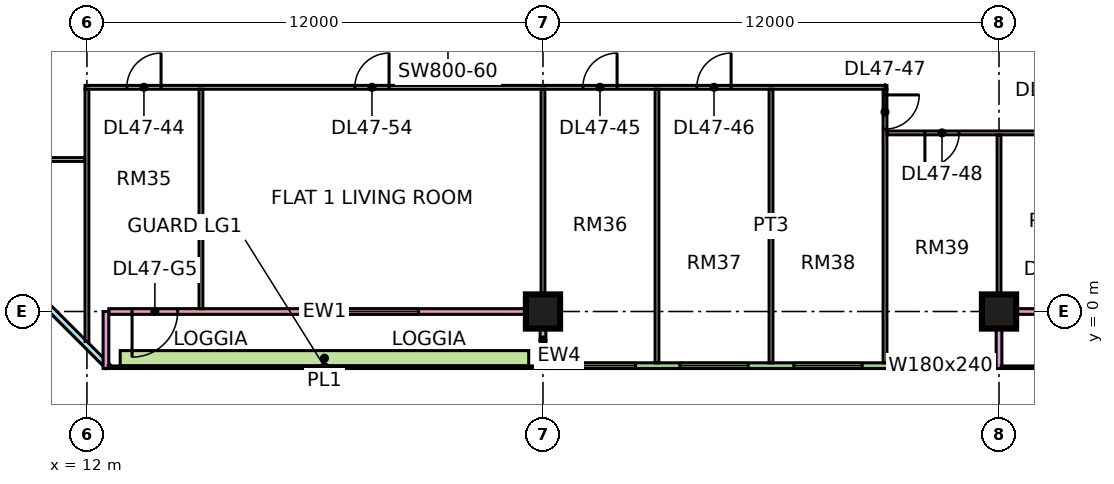
"""IFC4 building model, lengths in metres.
Left out: names, types, materials, properties, quantities, classifications, styles, units other than length and angle.
Written with IfcOpenShell. Run it as: python <this file> out.ifc"""

import sys

from ifc_helpers import new_model, si_unit, direction, frame, frame_2d, origin, origin_2d, place, context, subcontext, project, spatial, rectangle, extrude, element, fill, save


model = new_model("IFC4")
c1 = context("Model", 3, precision=1e-05, world=origin(), true_north=direction((0.0, 1.0)))
c2 = subcontext(c1, "Body", "Model", "MODEL_VIEW")
j1 = project(units=[si_unit("LENGTHUNIT", "METRE"), si_unit("PLANEANGLEUNIT", "RADIAN")], contexts=[c1])
p1 = place(None, origin())
s1 = spatial("IfcSite", under=j1, at=p1, CompositionType="ELEMENT")
p2 = place(p1, origin())
s2 = spatial("IfcBuilding", under=s1, at=p2, CompositionType="ELEMENT")
p3 = place(p2, frame((0.0, 0.0, 202.4)))
s3 = spatial("IfcBuildingStorey", under=s2, at=p3, CompositionType="ELEMENT", Elevation=202.4)
for number, where, z_axis, x_axis in (
    (1, (24.0, 0.0, 0.0), (0.0, 0.0, 1.0), (1.0, 0.0, 0.0)),
    (2, (36.0, 0.0, 0.0), (0.0, 0.0, 1.0), (1.0, 0.0, 0.0)),
):
    element("IfcColumn", number, at=place(p3, frame(where, z_axis=z_axis, x_axis=x_axis)), inside=s3, PredefinedType="COLUMN", context=c2, shape_type="SweptSolid", body=[
        extrude(rectangle(XDim=0.9, YDim=0.9, at=origin_2d()), origin(), (0.0, 0.0, 1.0), 3.75),
    ])
p4 = place(p3, frame((-1.447, 12.553, 0.0), z_axis=(0.0, 0.0, 1.0), x_axis=(0.707106781187, -0.707106781187, 0.0)))
e3 = element("IfcWall", 3, at=p4, inside=s3, PredefinedType="SOLIDWALL", context=c2, shape_type="SweptSolid", body=[
    extrude(rectangle(XDim=19.799, YDim=0.15, at=frame_2d((9.899, 0.0))), origin(), (0.0, 0.0, 1.0), 3.3),
])
p5 = place(p4, frame((2.212, 0.0, 0.45)))
e4 = element("IfcOpeningElement", 4, at=p5, cuts=e3, PredefinedType="OPENING", context=c2, shape_type="SweptSolid", body=[
    extrude(rectangle(XDim=3.0, YDim=2.4, at=frame_2d((1.5, 1.2))), frame((0.0, 0.085, 0.0), z_axis=(0.0, -1.0, 0.0), x_axis=(1.0, 0.0, 0.0)), (0.0, 0.0, 1.0), 0.17),
])
p6 = place(p4, frame((10.216, 0.0, 0.45)))
e5 = element("IfcOpeningElement", 5, at=p6, cuts=e3, PredefinedType="OPENING", context=c2, shape_type="SweptSolid", body=[
    extrude(rectangle(XDim=3.0, YDim=2.4, at=frame_2d((1.5, 1.2))), frame((0.0, 0.085, 0.0), z_axis=(0.0, -1.0, 0.0), x_axis=(1.0, 0.0, 0.0)), (0.0, 0.0, 1.0), 0.17),
])
p7 = place(p3, frame((12.575, 0.0, 0.0), z_axis=(0.0, 0.0, 1.0), x_axis=(1.0, 0.0, 0.0)))
e6 = element("IfcWall", 6, at=p7, inside=s3, PredefinedType="SOLIDWALL", context=c2, shape_type="SweptSolid", body=[
    extrude(rectangle(XDim=11.35, YDim=0.15, at=frame_2d((5.675, 0.0))), origin(), (0.0, 0.0, 1.0), 3.3),
])
p8 = place(p7, frame((0.613, 0.0, 0.0)))
e7 = element("IfcOpeningElement", 7, at=p8, cuts=e6, PredefinedType="OPENING", context=c2, shape_type="SweptSolid", body=[
    extrude(rectangle(XDim=1.2, YDim=2.4, at=frame_2d((0.6, 1.2))), frame((0.0, 0.085, 0.0), z_axis=(0.0, -1.0, 0.0), x_axis=(1.0, 0.0, 0.0)), (0.0, 0.0, 1.0), 0.17),
])
p9 = place(p7, frame((5.15, 0.0, 0.45)))
e8 = element("IfcOpeningElement", 8, at=p9, cuts=e6, PredefinedType="OPENING", context=c2, shape_type="SweptSolid", body=[
    extrude(rectangle(XDim=3.0, YDim=2.4, at=frame_2d((1.5, 1.2))), frame((0.0, 0.085, 0.0), z_axis=(0.0, -1.0, 0.0), x_axis=(1.0, 0.0, 0.0)), (0.0, 0.0, 1.0), 0.17),
])
for number, where, z_axis, x_axis in (
    (9, (12.5, -1.5, 0.0), (0.0, 0.0, 1.0), (0.0, 1.0, 0.0)),
    (10, (24.0, -1.5, 0.0), (0.0, 0.0, 1.0), (0.0, 1.0, 0.0)),
):
    element("IfcWall", number, at=place(p3, frame(where, z_axis=z_axis, x_axis=x_axis)), inside=s3, PredefinedType="SOLIDWALL", context=c2, shape_type="SweptSolid", body=[
        extrude(rectangle(XDim=1.5, YDim=0.15, at=frame_2d((0.75, 0.0))), origin(), (0.0, 0.0, 1.0), 3.3),
    ])
p10 = place(p3, frame((24.075, -1.425, 0.0), z_axis=(0.0, 0.0, 1.0), x_axis=(1.0, 0.0, 0.0)))
e11 = element("IfcWall", 11, at=p10, inside=s3, PredefinedType="SOLIDWALL", context=c2, shape_type="SweptSolid", body=[
    extrude(rectangle(XDim=11.85, YDim=0.15, at=frame_2d((5.925, 0.0))), origin(), (0.0, 0.0, 1.0), 3.3),
])
p11 = place(p10, frame((0.562, 0.0, 0.45)))
e12 = element("IfcOpeningElement", 12, at=p11, cuts=e11, PredefinedType="OPENING", context=c2, shape_type="SweptSolid", body=[
    extrude(rectangle(XDim=1.8, YDim=2.4, at=frame_2d((0.9, 1.2))), frame((0.0, 0.085, 0.0), z_axis=(0.0, -1.0, 0.0), x_axis=(1.0, 0.0, 0.0)), (0.0, 0.0, 1.0), 0.17),
])
p12 = place(p10, frame((3.525, 0.0, 0.45)))
e13 = element("IfcOpeningElement", 13, at=p12, cuts=e11, PredefinedType="OPENING", context=c2, shape_type="SweptSolid", body=[
    extrude(rectangle(XDim=1.8, YDim=2.4, at=frame_2d((0.9, 1.2))), frame((0.0, 0.085, 0.0), z_axis=(0.0, -1.0, 0.0), x_axis=(1.0, 0.0, 0.0)), (0.0, 0.0, 1.0), 0.17),
])
p13 = place(p10, frame((6.525, 0.0, 0.45)))
e14 = element("IfcOpeningElement", 14, at=p13, cuts=e11, PredefinedType="OPENING", context=c2, shape_type="SweptSolid", body=[
    extrude(rectangle(XDim=1.8, YDim=2.4, at=frame_2d((0.9, 1.2))), frame((0.0, 0.085, 0.0), z_axis=(0.0, -1.0, 0.0), x_axis=(1.0, 0.0, 0.0)), (0.0, 0.0, 1.0), 0.17),
])
p14 = place(p10, frame((9.488, 0.0, 0.45)))
e15 = element("IfcOpeningElement", 15, at=p14, cuts=e11, PredefinedType="OPENING", context=c2, shape_type="SweptSolid", body=[
    extrude(rectangle(XDim=1.8, YDim=2.4, at=frame_2d((0.9, 1.2))), frame((0.0, 0.085, 0.0), z_axis=(0.0, -1.0, 0.0), x_axis=(1.0, 0.0, 0.0)), (0.0, 0.0, 1.0), 0.17),
])
p15 = place(p3, frame((36.075, 0.0, 0.0), z_axis=(0.0, 0.0, 1.0), x_axis=(1.0, 0.0, 0.0)))
e16 = element("IfcWall", 16, at=p15, inside=s3, PredefinedType="SOLIDWALL", context=c2, shape_type="SweptSolid", body=[
    extrude(rectangle(XDim=11.85, YDim=0.15, at=frame_2d((5.925, 0.0))), origin(), (0.0, 0.0, 1.0), 3.3),
])
p16 = place(p15, frame((1.1, 0.0, 0.0)))
e17 = element("IfcOpeningElement", 17, at=p16, cuts=e16, PredefinedType="OPENING", context=c2, shape_type="SweptSolid", body=[
    extrude(rectangle(XDim=1.2, YDim=2.4, at=frame_2d((0.6, 1.2))), frame((0.0, 0.085, 0.0), z_axis=(0.0, -1.0, 0.0), x_axis=(1.0, 0.0, 0.0)), (0.0, 0.0, 1.0), 0.17),
])
p17 = place(p15, frame((4.15, 0.0, 0.45)))
e18 = element("IfcOpeningElement", 18, at=p17, cuts=e16, PredefinedType="OPENING", context=c2, shape_type="SweptSolid", body=[
    extrude(rectangle(XDim=3.0, YDim=2.4, at=frame_2d((1.5, 1.2))), frame((0.0, 0.085, 0.0), z_axis=(0.0, -1.0, 0.0), x_axis=(1.0, 0.0, 0.0)), (0.0, 0.0, 1.0), 0.17),
])
p18 = place(p15, frame((10.062, 0.0, 0.45)))
e19 = element("IfcOpeningElement", 19, at=p18, cuts=e16, PredefinedType="OPENING", context=c2, shape_type="SweptSolid", body=[
    extrude(rectangle(XDim=1.2, YDim=2.4, at=frame_2d((0.6, 1.2))), frame((0.0, 0.085, 0.0), z_axis=(0.0, -1.0, 0.0), x_axis=(1.0, 0.0, 0.0)), (0.0, 0.0, 1.0), 0.17),
])
p19 = place(p3, frame((36.0, -1.5, 0.0), z_axis=(0.0, 0.0, 1.0), x_axis=(0.0, 1.0, 0.0)))
e20 = element("IfcWall", 20, at=p19, inside=s3, PredefinedType="SOLIDWALL", context=c2, shape_type="SweptSolid", body=[
    extrude(rectangle(XDim=1.5, YDim=0.15, at=frame_2d((0.75, 0.0))), origin(), (0.0, 0.0, 1.0), 3.3),
])
p20 = place(p3, frame((12.875, -1.229, 0.0), z_axis=(0.0, 0.0, 1.0), x_axis=(1.0, 0.0, 0.0)))
e21 = element("IfcWall", 21, at=p20, inside=s3, PredefinedType="SOLIDWALL", context=c2, shape_type="SweptSolid", body=[
    extrude(rectangle(XDim=10.75, YDim=0.4, at=frame_2d((5.375, 0.0))), origin(), (0.0, 0.0, 1.0), 0.7),
])
p21 = place(p3, frame((9.05, 4.0, 0.0), z_axis=(0.0, 0.0, 1.0), x_axis=(1.0, 0.0, 0.0)))
e22 = element("IfcWall", 22, at=p21, inside=s3, PredefinedType="PARTITIONING", context=c2, shape_type="SweptSolid", body=[
    extrude(rectangle(XDim=2.9, YDim=0.1, at=frame_2d((1.45, 0.0))), origin(), (0.0, 0.0, 1.0), 3.3),
])
p22 = place(p3, frame((11.95, 5.9, 0.0), z_axis=(0.0, 0.0, 1.0), x_axis=(1.0, 0.0, 0.0)))
e23 = element("IfcWall", 23, at=p22, inside=s3, PredefinedType="PARTITIONING", context=c2, shape_type="SweptSolid", body=[
    extrude(rectangle(XDim=21.1, YDim=0.1, at=frame_2d((10.55, 0.0))), origin(), (0.0, 0.0, 1.0), 3.3),
])
p23 = place(p22, frame((1.1, 0.0, 0.0)))
e24 = element("IfcOpeningElement", 24, at=p23, cuts=e23, PredefinedType="OPENING", context=c2, shape_type="SweptSolid", body=[
    extrude(rectangle(XDim=0.9, YDim=2.1, at=frame_2d((0.45, 1.05))), frame((0.0, 0.06, 0.0), z_axis=(0.0, -1.0, 0.0), x_axis=(1.0, 0.0, 0.0)), (0.0, 0.0, 1.0), 0.12),
])
p24 = place(p22, frame((13.1, 0.0, 0.0)))
e25 = element("IfcOpeningElement", 25, at=p24, cuts=e23, PredefinedType="OPENING", context=c2, shape_type="SweptSolid", body=[
    extrude(rectangle(XDim=0.9, YDim=2.1, at=frame_2d((0.45, 1.05))), frame((0.0, 0.06, 0.0), z_axis=(0.0, -1.0, 0.0), x_axis=(1.0, 0.0, 0.0)), (0.0, 0.0, 1.0), 0.12),
])
p25 = place(p22, frame((16.1, 0.0, 0.0)))
e26 = element("IfcOpeningElement", 26, at=p25, cuts=e23, PredefinedType="OPENING", context=c2, shape_type="SweptSolid", body=[
    extrude(rectangle(XDim=0.9, YDim=2.1, at=frame_2d((0.45, 1.05))), frame((0.0, 0.06, 0.0), z_axis=(0.0, -1.0, 0.0), x_axis=(1.0, 0.0, 0.0)), (0.0, 0.0, 1.0), 0.12),
])
p26 = place(p22, frame((7.1, 0.0, 0.0)))
e27 = element("IfcOpeningElement", 27, at=p26, cuts=e23, PredefinedType="OPENING", context=c2, shape_type="SweptSolid", body=[
    extrude(rectangle(XDim=0.9, YDim=2.1, at=frame_2d((0.45, 1.05))), frame((0.0, 0.06, 0.0), z_axis=(0.0, -1.0, 0.0), x_axis=(1.0, 0.0, 0.0)), (0.0, 0.0, 1.0), 0.12),
])
p27 = place(p3, frame((12.0, -0.788, 0.0), z_axis=(0.0, 0.0, 1.0), x_axis=(0.0, 1.0, 0.0)))
e28 = element("IfcWall", 28, at=p27, inside=s3, PredefinedType="PARTITIONING", context=c2, shape_type="SweptSolid", body=[
    extrude(rectangle(XDim=6.638, YDim=0.1, at=frame_2d((3.319, 0.0))), origin(), (0.0, 0.0, 1.0), 3.3),
])
p28 = place(p3, frame((15.0, 0.074, 0.0), z_axis=(0.0, 0.0, 1.0), x_axis=(0.0, 1.0, 0.0)))
e29 = element("IfcWall", 29, at=p28, inside=s3, PredefinedType="PARTITIONING", context=c2, shape_type="SweptSolid", body=[
    extrude(rectangle(XDim=5.776, YDim=0.1, at=frame_2d((2.888, 0.0))), origin(), (0.0, 0.0, 1.0), 3.3),
])
p29 = place(p3, frame((24.0, 0.0, 0.0), z_axis=(0.0, 0.0, 1.0), x_axis=(0.0, 1.0, 0.0)))
e30 = element("IfcWall", 30, at=p29, inside=s3, PredefinedType="PARTITIONING", context=c2, shape_type="SweptSolid", body=[
    extrude(rectangle(XDim=5.85, YDim=0.1, at=frame_2d((2.925, 0.0))), origin(), (0.0, 0.0, 1.0), 3.3),
])
for number, where, z_axis, x_axis in (
    (31, (27.0, -1.351, 0.0), (0.0, 0.0, 1.0), (0.0, 1.0, 0.0)),
    (32, (30.0, -1.351, 0.0), (0.0, 0.0, 1.0), (0.0, 1.0, 0.0)),
):
    element("IfcWall", number, at=place(p3, frame(where, z_axis=z_axis, x_axis=x_axis)), inside=s3, PredefinedType="PARTITIONING", context=c2, shape_type="SweptSolid", body=[
        extrude(rectangle(XDim=7.201, YDim=0.1, at=frame_2d((3.601, 0.0))), origin(), (0.0, 0.0, 1.0), 3.3),
    ])
p30 = place(p3, frame((33.0, -1.351, 0.0), z_axis=(0.0, 0.0, 1.0), x_axis=(0.0, 1.0, 0.0)))
e33 = element("IfcWall", 33, at=p30, inside=s3, PredefinedType="PARTITIONING", context=c2, shape_type="SweptSolid", body=[
    extrude(rectangle(XDim=7.201, YDim=0.1, at=frame_2d((3.601, 0.0))), origin(), (0.0, 0.0, 1.0), 3.3),
])
p31 = place(p30, frame((6.151, 0.0, 0.0)))
e34 = element("IfcOpeningElement", 34, at=p31, cuts=e33, PredefinedType="OPENING", context=c2, shape_type="SweptSolid", body=[
    extrude(rectangle(XDim=0.9, YDim=2.1, at=frame_2d((0.45, 1.05))), frame((0.0, 0.06, 0.0), z_axis=(0.0, -1.0, 0.0), x_axis=(1.0, 0.0, 0.0)), (0.0, 0.0, 1.0), 0.12),
])
p32 = place(p3, frame((33.05, 4.7, 0.0), z_axis=(0.0, 0.0, 1.0), x_axis=(1.0, 0.0, 0.0)))
e35 = element("IfcWall", 35, at=p32, inside=s3, PredefinedType="PARTITIONING", context=c2, shape_type="SweptSolid", body=[
    extrude(rectangle(XDim=14.85, YDim=0.1, at=frame_2d((7.425, 0.0))), origin(), (0.0, 0.0, 1.0), 3.3),
])
p33 = place(p32, frame((1.0, 0.0, 0.0)))
e36 = element("IfcOpeningElement", 36, at=p33, cuts=e35, PredefinedType="OPENING", context=c2, shape_type="SweptSolid", body=[
    extrude(rectangle(XDim=0.9, YDim=2.1, at=frame_2d((0.45, 1.05))), frame((0.0, 0.06, 0.0), z_axis=(0.0, -1.0, 0.0), x_axis=(1.0, 0.0, 0.0)), (0.0, 0.0, 1.0), 0.12),
])
p34 = place(p32, frame((4.0, 0.0, 0.0)))
e37 = element("IfcOpeningElement", 37, at=p34, cuts=e35, PredefinedType="OPENING", context=c2, shape_type="SweptSolid", body=[
    extrude(rectangle(XDim=0.9, YDim=2.1, at=frame_2d((0.45, 1.05))), frame((0.0, 0.06, 0.0), z_axis=(0.0, -1.0, 0.0), x_axis=(1.0, 0.0, 0.0)), (0.0, 0.0, 1.0), 0.12),
])
p35 = place(p32, frame((10.0, 0.0, 0.0)))
e38 = element("IfcOpeningElement", 38, at=p35, cuts=e35, PredefinedType="OPENING", context=c2, shape_type="SweptSolid", body=[
    extrude(rectangle(XDim=0.9, YDim=2.1, at=frame_2d((0.45, 1.05))), frame((0.0, 0.06, 0.0), z_axis=(0.0, -1.0, 0.0), x_axis=(1.0, 0.0, 0.0)), (0.0, 0.0, 1.0), 0.12),
])
p36 = place(p3, frame((36.0, 0.0, 0.0), z_axis=(0.0, 0.0, 1.0), x_axis=(0.0, 1.0, 0.0)))
e39 = element("IfcWall", 39, at=p36, inside=s3, PredefinedType="PARTITIONING", context=c2, shape_type="SweptSolid", body=[
    extrude(rectangle(XDim=4.65, YDim=0.1, at=frame_2d((2.325, 0.0))), origin(), (0.0, 0.0, 1.0), 3.3),
])
p37 = place(p8, frame((1.2, 0.0, 0.0), z_axis=(0.0, 0.0, 1.0), x_axis=(-1.0, 0.0, 0.0)))
e40 = element("IfcDoor", 40, at=p37, inside=s3, OperationType="DOUBLE_DOOR_SINGLE_SWING", PredefinedType="DOOR", context=c2, shape_type="SweptSolid", body=[
    extrude(rectangle(XDim=1.2, YDim=2.4, at=frame_2d((0.6, 1.2))), frame((0.0, 0.025, 0.0), z_axis=(0.0, -1.0, 0.0), x_axis=(1.0, 0.0, 0.0)), (0.0, 0.0, 1.0), 0.05),
])
fill(e7, e40)
p38 = place(p9, origin())
e41 = element("IfcWindow", 41, at=p38, inside=s3, PartitioningType="SINGLE_PANEL", PredefinedType="WINDOW", context=c2, shape_type="SweptSolid", body=[
    extrude(rectangle(XDim=3.0, YDim=2.4, at=frame_2d((1.5, 1.2))), frame((0.0, 0.03, 0.0), z_axis=(0.0, -1.0, 0.0), x_axis=(1.0, 0.0, 0.0)), (0.0, 0.0, 1.0), 0.06),
])
fill(e8, e41)
p39 = place(p11, origin())
e42 = element("IfcWindow", 42, at=p39, inside=s3, PartitioningType="SINGLE_PANEL", PredefinedType="WINDOW", context=c2, shape_type="SweptSolid", body=[
    extrude(rectangle(XDim=1.8, YDim=2.4, at=frame_2d((0.9, 1.2))), frame((0.0, 0.03, 0.0), z_axis=(0.0, -1.0, 0.0), x_axis=(1.0, 0.0, 0.0)), (0.0, 0.0, 1.0), 0.06),
])
fill(e12, e42)
p40 = place(p12, origin())
e43 = element("IfcWindow", 43, at=p40, inside=s3, PartitioningType="SINGLE_PANEL", PredefinedType="WINDOW", context=c2, shape_type="SweptSolid", body=[
    extrude(rectangle(XDim=1.8, YDim=2.4, at=frame_2d((0.9, 1.2))), frame((0.0, 0.03, 0.0), z_axis=(0.0, -1.0, 0.0), x_axis=(1.0, 0.0, 0.0)), (0.0, 0.0, 1.0), 0.06),
])
fill(e13, e43)
p41 = place(p13, origin())
e44 = element("IfcWindow", 44, at=p41, inside=s3, PartitioningType="SINGLE_PANEL", PredefinedType="WINDOW", context=c2, shape_type="SweptSolid", body=[
    extrude(rectangle(XDim=1.8, YDim=2.4, at=frame_2d((0.9, 1.2))), frame((0.0, 0.03, 0.0), z_axis=(0.0, -1.0, 0.0), x_axis=(1.0, 0.0, 0.0)), (0.0, 0.0, 1.0), 0.06),
])
fill(e14, e44)
p42 = place(p14, origin())
e45 = element("IfcWindow", 45, at=p42, inside=s3, PartitioningType="SINGLE_PANEL", PredefinedType="WINDOW", context=c2, shape_type="SweptSolid", body=[
    extrude(rectangle(XDim=1.8, YDim=2.4, at=frame_2d((0.9, 1.2))), frame((0.0, 0.03, 0.0), z_axis=(0.0, -1.0, 0.0), x_axis=(1.0, 0.0, 0.0)), (0.0, 0.0, 1.0), 0.06),
])
fill(e15, e45)
p43 = place(p23, frame((0.9, 0.0, 0.0), z_axis=(0.0, 0.0, 1.0), x_axis=(-1.0, 0.0, 0.0)))
e46 = element("IfcDoor", 46, at=p43, inside=s3, OperationType="SINGLE_SWING_RIGHT", PredefinedType="DOOR", context=c2, shape_type="SweptSolid", body=[
    extrude(rectangle(XDim=0.9, YDim=2.1, at=frame_2d((0.45, 1.05))), frame((0.0, 0.025, 0.0), z_axis=(0.0, -1.0, 0.0), x_axis=(1.0, 0.0, 0.0)), (0.0, 0.0, 1.0), 0.05),
])
fill(e24, e46)
p44 = place(p24, frame((0.9, 0.0, 0.0), z_axis=(0.0, 0.0, 1.0), x_axis=(-1.0, 0.0, 0.0)))
e47 = element("IfcDoor", 47, at=p44, inside=s3, OperationType="SINGLE_SWING_RIGHT", PredefinedType="DOOR", context=c2, shape_type="SweptSolid", body=[
    extrude(rectangle(XDim=0.9, YDim=2.1, at=frame_2d((0.45, 1.05))), frame((0.0, 0.025, 0.0), z_axis=(0.0, -1.0, 0.0), x_axis=(1.0, 0.0, 0.0)), (0.0, 0.0, 1.0), 0.05),
])
fill(e25, e47)
p45 = place(p25, frame((0.9, 0.0, 0.0), z_axis=(0.0, 0.0, 1.0), x_axis=(-1.0, 0.0, 0.0)))
e48 = element("IfcDoor", 48, at=p45, inside=s3, OperationType="SINGLE_SWING_RIGHT", PredefinedType="DOOR", context=c2, shape_type="SweptSolid", body=[
    extrude(rectangle(XDim=0.9, YDim=2.1, at=frame_2d((0.45, 1.05))), frame((0.0, 0.025, 0.0), z_axis=(0.0, -1.0, 0.0), x_axis=(1.0, 0.0, 0.0)), (0.0, 0.0, 1.0), 0.05),
])
fill(e26, e48)
p46 = place(p31, origin())
e49 = element("IfcDoor", 49, at=p46, inside=s3, OperationType="SINGLE_SWING_RIGHT", PredefinedType="DOOR", context=c2, shape_type="SweptSolid", body=[
    extrude(rectangle(XDim=0.9, YDim=2.1, at=frame_2d((0.45, 1.05))), frame((0.0, 0.025, 0.0), z_axis=(0.0, -1.0, 0.0), x_axis=(1.0, 0.0, 0.0)), (0.0, 0.0, 1.0), 0.05),
])
fill(e34, e49)
p47 = place(p33, frame((0.9, 0.0, 0.0), z_axis=(0.0, 0.0, 1.0), x_axis=(-1.0, 0.0, 0.0)))
e50 = element("IfcDoor", 50, at=p47, inside=s3, OperationType="SINGLE_SWING_LEFT", PredefinedType="DOOR", context=c2, shape_type="SweptSolid", body=[
    extrude(rectangle(XDim=0.9, YDim=2.1, at=frame_2d((0.45, 1.05))), frame((0.0, 0.025, 0.0), z_axis=(0.0, -1.0, 0.0), x_axis=(1.0, 0.0, 0.0)), (0.0, 0.0, 1.0), 0.05),
])
fill(e36, e50)
p48 = place(p26, frame((0.9, 0.0, 0.0), z_axis=(0.0, 0.0, 1.0), x_axis=(-1.0, 0.0, 0.0)))
e51 = element("IfcDoor", 51, at=p48, inside=s3, OperationType="SINGLE_SWING_RIGHT", PredefinedType="DOOR", context=c2, shape_type="SweptSolid", body=[
    extrude(rectangle(XDim=0.9, YDim=2.1, at=frame_2d((0.45, 1.05))), frame((0.0, 0.025, 0.0), z_axis=(0.0, -1.0, 0.0), x_axis=(1.0, 0.0, 0.0)), (0.0, 0.0, 1.0), 0.05),
])
fill(e27, e51)
save(model, sys.argv[1])
